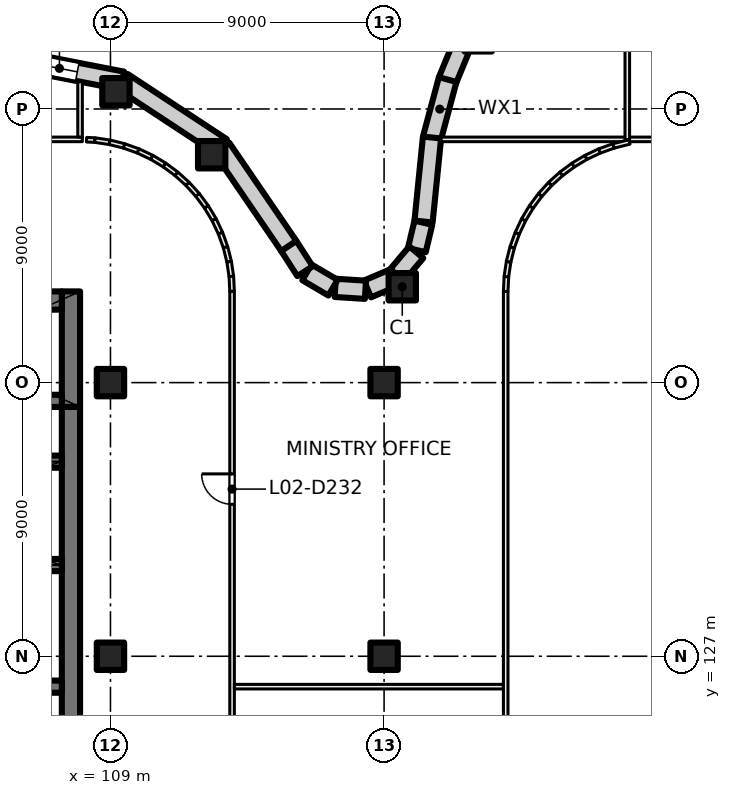
"""IFC4 building model, lengths in metres.
Left out: names, types, materials, properties, quantities, classifications, styles, units other than length and angle.
Written with IfcOpenShell. Run it as: python <this file> out.ifc"""

import sys

from ifc_helpers import new_model, si_unit, direction, frame, frame_2d, origin, origin_2d, place, context, subcontext, project, spatial, rectangle, extrude, element, fill, save


model = new_model("IFC4")
c1 = context("Model", 3, precision=1e-05, world=origin(), true_north=direction((0.0, 1.0)))
c2 = subcontext(c1, "Body", "Model", "MODEL_VIEW")
j1 = project(units=[si_unit("LENGTHUNIT", "METRE"), si_unit("PLANEANGLEUNIT", "RADIAN")], contexts=[c1])
p1 = place(None, origin())
s1 = spatial("IfcSite", under=j1, at=p1, CompositionType="ELEMENT")
p2 = place(p1, origin())
s2 = spatial("IfcBuilding", under=s1, at=p2, CompositionType="ELEMENT")
p3 = place(p2, frame((0.0, 0.0, 12.5)))
s3 = spatial("IfcBuildingStorey", under=s2, at=p3, CompositionType="ELEMENT", Elevation=12.5)
for number, where, z_axis, x_axis in (
    (1, (109.0, 127.0, 0.0), (0.0, 0.0, 1.0), (1.0, 0.0, 0.0)),
    (2, (109.0, 136.0, 0.0), (0.0, 0.0, 1.0), (1.0, 0.0, 0.0)),
    (3, (118.0, 127.0, 0.0), (0.0, 0.0, 1.0), (1.0, 0.0, 0.0)),
    (4, (118.0, 136.0, 0.0), (0.0, 0.0, 1.0), (1.0, 0.0, 0.0)),
    (5, (109.18, 145.567, 0.0), (0.0, 0.0, 1.0), (1.0, 0.0, 0.0)),
    (6, (112.329, 143.496, 0.0), (0.0, 0.0, 1.0), (1.0, 0.0, 0.0)),
    (7, (118.598, 139.153, 0.0), (0.0, 0.0, 1.0), (1.0, 0.0, 0.0)),
):
    element("IfcColumn", number, at=place(p3, frame(where, z_axis=z_axis, x_axis=x_axis)), inside=s3, PredefinedType="COLUMN", context=c2, shape_type="SweptSolid", body=[
        extrude(rectangle(XDim=0.9, YDim=0.9, at=origin_2d()), origin(), (0.0, 0.0, 1.0), 5.0),
    ])
p4 = place(p3, frame((107.7, 139.0, 0.0), z_axis=(0.0, 0.0, 1.0), x_axis=(0.0, -1.0, 0.0)))
e8 = element("IfcWall", 8, at=p4, inside=s3, PredefinedType="SHEAR", context=c2, shape_type="SweptSolid", body=[
    extrude(rectangle(XDim=3.8, YDim=0.6, at=frame_2d((1.9, 0.0))), origin(), (0.0, 0.0, 1.0), 5.0),
])
p5 = place(p3, frame((107.7, 135.2, 0.0), z_axis=(0.0, 0.0, 1.0), x_axis=(0.0, -1.0, 0.0)))
e9 = element("IfcWall", 9, at=p5, inside=s3, PredefinedType="SHEAR", context=c2, shape_type="SweptSolid", body=[
    extrude(rectangle(XDim=14.4, YDim=0.6, at=frame_2d((7.2, 0.0))), origin(), (0.0, 0.0, 1.0), 5.0),
])
p6 = place(p3, frame((107.4, 138.7, 0.0), z_axis=(0.0, 0.0, 1.0), x_axis=(-1.0, 0.0, 0.0)))
e10 = element("IfcWall", 10, at=p6, inside=s3, PredefinedType="SHEAR", context=c2, shape_type="SweptSolid", body=[
    extrude(rectangle(XDim=7.8, YDim=0.6, at=frame_2d((3.9, 0.0))), origin(), (0.0, 0.0, 1.0), 5.0),
])
p7 = place(p3, frame((107.4, 135.4, 0.0), z_axis=(0.0, 0.0, 1.0), x_axis=(-1.0, 0.0, 0.0)))
e11 = element("IfcWall", 11, at=p7, inside=s3, PredefinedType="SHEAR", context=c2, shape_type="SweptSolid", body=[
    extrude(rectangle(XDim=7.8, YDim=0.4, at=frame_2d((3.9, 0.0))), origin(), (0.0, 0.0, 1.0), 5.0),
])
p8 = place(p3, frame((107.4, 130.0, 0.0), z_axis=(0.0, 0.0, 1.0), x_axis=(-1.0, 0.0, 0.0)))
e12 = element("IfcWall", 12, at=p8, inside=s3, PredefinedType="SHEAR", context=c2, shape_type="SweptSolid", body=[
    extrude(rectangle(XDim=12.2, YDim=0.4, at=frame_2d((6.1, 0.0))), origin(), (0.0, 0.0, 1.0), 5.0),
])
p9 = place(p8, frame((5.45, 0.0, 0.0)))
e13 = element("IfcOpeningElement", 13, at=p9, cuts=e12, PredefinedType="OPENING", context=c2, shape_type="SweptSolid", body=[
    extrude(rectangle(XDim=1.1, YDim=2.1, at=frame_2d((0.55, 1.05))), frame((0.0, 0.21, 0.0), z_axis=(0.0, -1.0, 0.0), x_axis=(1.0, 0.0, 0.0)), (0.0, 0.0, 1.0), 0.42),
])
p10 = place(p8, frame((7.85, 0.0, 0.0)))
e14 = element("IfcOpeningElement", 14, at=p10, cuts=e12, PredefinedType="OPENING", context=c2, shape_type="SweptSolid", body=[
    extrude(rectangle(XDim=1.1, YDim=2.1, at=frame_2d((0.55, 1.05))), frame((0.0, 0.21, 0.0), z_axis=(0.0, -1.0, 0.0), x_axis=(1.0, 0.0, 0.0)), (0.0, 0.0, 1.0), 0.42),
])
p11 = place(p3, frame((107.4, 133.4, 0.0), z_axis=(0.0, 0.0, 1.0), x_axis=(-1.0, 0.0, 0.0)))
e15 = element("IfcWall", 15, at=p11, inside=s3, PredefinedType="SHEAR", context=c2, shape_type="SweptSolid", body=[
    extrude(rectangle(XDim=12.2, YDim=0.4, at=frame_2d((6.1, 0.0))), origin(), (0.0, 0.0, 1.0), 5.0),
])
p12 = place(p11, frame((10.3, 0.0, 0.0)))
e16 = element("IfcOpeningElement", 16, at=p12, cuts=e15, PredefinedType="OPENING", context=c2, shape_type="SweptSolid", body=[
    extrude(rectangle(XDim=1.1, YDim=2.1, at=frame_2d((0.55, 1.05))), frame((0.0, 0.21, 0.0), z_axis=(0.0, -1.0, 0.0), x_axis=(1.0, 0.0, 0.0)), (0.0, 0.0, 1.0), 0.42),
])
p13 = place(p3, frame((107.4, 126.0, 0.0), z_axis=(0.0, 0.0, 1.0), x_axis=(-1.0, 0.0, 0.0)))
e17 = element("IfcWall", 17, at=p13, inside=s3, PredefinedType="SHEAR", context=c2, shape_type="SweptSolid", body=[
    extrude(rectangle(XDim=12.2, YDim=0.4, at=frame_2d((6.1, 0.0))), origin(), (0.0, 0.0, 1.0), 5.0),
])
p14 = place(p13, frame((10.25, 0.0, 0.0)))
e18 = element("IfcOpeningElement", 18, at=p14, cuts=e17, PredefinedType="OPENING", context=c2, shape_type="SweptSolid", body=[
    extrude(rectangle(XDim=1.1, YDim=2.1, at=frame_2d((0.55, 1.05))), frame((0.0, 0.21, 0.0), z_axis=(0.0, -1.0, 0.0), x_axis=(1.0, 0.0, 0.0)), (0.0, 0.0, 1.0), 0.42),
])
p15 = place(p13, frame((0.7, 0.0, 0.0)))
e19 = element("IfcOpeningElement", 19, at=p15, cuts=e17, PredefinedType="OPENING", context=c2, shape_type="SweptSolid", body=[
    extrude(rectangle(XDim=0.8, YDim=2.1, at=frame_2d((0.4, 1.05))), frame((0.0, 0.21, 0.0), z_axis=(0.0, -1.0, 0.0), x_axis=(1.0, 0.0, 0.0)), (0.0, 0.0, 1.0), 0.42),
])
p16 = place(p3, frame((120.079, 145.931, 0.0), z_axis=(0.0, 0.0, 1.0), x_axis=(0.382375593358, 0.924006983526, 0.0)))
e20 = element("IfcWall", 20, at=p16, inside=s3, PredefinedType="SOLIDWALL", context=c2, shape_type="SweptSolid", body=[
    extrude(rectangle(XDim=2.114, YDim=0.6, at=frame_2d((1.057, 0.0))), origin(), (0.0, 0.0, 1.0), 4.6),
])
p17 = place(p3, frame((119.571, 144.024, 0.0), z_axis=(0.0, 0.0, 1.0), x_axis=(0.25888565912, 0.965907974655, 0.0)))
e21 = element("IfcWall", 21, at=p17, inside=s3, PredefinedType="SOLIDWALL", context=c2, shape_type="SweptSolid", body=[
    extrude(rectangle(XDim=2.012, YDim=0.6, at=frame_2d((1.006, 0.0))), origin(), (0.0, 0.0, 1.0), 4.6),
])
p18 = place(p3, frame((119.299, 141.298, 0.0), z_axis=(0.0, 0.0, 1.0), x_axis=(0.100121632527, 0.994975205068, 0.0)))
e22 = element("IfcWall", 22, at=p18, inside=s3, PredefinedType="SOLIDWALL", context=c2, shape_type="SweptSolid", body=[
    extrude(rectangle(XDim=2.777, YDim=0.6, at=frame_2d((1.389, 0.0))), origin(), (0.0, 0.0, 1.0), 4.6),
])
p19 = place(p3, frame((119.077, 140.358, 0.0), z_axis=(0.0, 0.0, 1.0), x_axis=(0.231477954295, 0.972840149601, 0.0)))
e23 = element("IfcWall", 23, at=p19, inside=s3, PredefinedType="SOLIDWALL", context=c2, shape_type="SweptSolid", body=[
    extrude(rectangle(XDim=0.926, YDim=0.6, at=frame_2d((0.463, 0.0))), origin(), (0.0, 0.0, 1.0), 4.6),
])
for number, where, z_axis, x_axis in (
    (24, (118.417, 139.526, 0.0), (0.0, 0.0, 1.0), (0.645, 0.764, 0.0)),
    (25, (117.454, 139.081, 0.0), (0.0, 0.0, 1.0), (0.92, 0.392, 0.0)),
    (26, (116.393, 139.117, 0.0), (0.0, 0.0, 1.0), (0.998, -0.064, 0.0)),
    (27, (115.461, 139.627, 0.0), (0.0, 0.0, 1.0), (0.862, -0.507, 0.0)),
):
    element("IfcWall", number, at=place(p3, frame(where, z_axis=z_axis, x_axis=x_axis)), inside=s3, PredefinedType="SOLIDWALL", context=c2, shape_type="SweptSolid", body=[
        extrude(rectangle(XDim=0.996, YDim=0.6, at=frame_2d((0.498, 0.0))), origin(), (0.0, 0.0, 1.0), 4.6),
    ])
p20 = place(p3, frame((114.86, 140.502, 0.0), z_axis=(0.0, 0.0, 1.0), x_axis=(0.541339592117, -0.84080404733, 0.0)))
e28 = element("IfcWall", 28, at=p20, inside=s3, PredefinedType="SOLIDWALL", context=c2, shape_type="SweptSolid", body=[
    extrude(rectangle(XDim=0.996, YDim=0.6, at=frame_2d((0.498, 0.0))), origin(), (0.0, 0.0, 1.0), 4.6),
])
p21 = place(p3, frame((112.661, 143.72, 0.0), z_axis=(0.0, 0.0, 1.0), x_axis=(0.564314082571, -0.825560183277, 0.0)))
e29 = element("IfcWall", 29, at=p21, inside=s3, PredefinedType="SOLIDWALL", context=c2, shape_type="SweptSolid", body=[
    extrude(rectangle(XDim=3.905, YDim=0.6, at=frame_2d((1.953, 0.0))), origin(), (0.0, 0.0, 1.0), 4.6),
])
p22 = place(p3, frame((109.401, 145.9, 0.0), z_axis=(0.0, 0.0, 1.0), x_axis=(0.835543958523, -0.549423601037, 0.0)))
e30 = element("IfcWall", 30, at=p22, inside=s3, PredefinedType="SOLIDWALL", context=c2, shape_type="SweptSolid", body=[
    extrude(rectangle(XDim=3.906, YDim=0.6, at=frame_2d((1.953, 0.0))), origin(), (0.0, 0.0, 1.0), 4.6),
])
p23 = place(p3, frame((105.44, 146.702, 0.0), z_axis=(0.0, 0.0, 1.0), x_axis=(0.981593603981, -0.190981665674, 0.0)))
e31 = element("IfcWall", 31, at=p23, inside=s3, PredefinedType="SOLIDWALL", context=c2, shape_type="SweptSolid", body=[
    extrude(rectangle(XDim=4.025, YDim=0.6, at=frame_2d((2.013, 0.0))), origin(), (0.0, 0.0, 1.0), 4.6),
])
p24 = place(p23, frame((1.316, 0.0, 0.9)))
e32 = element("IfcOpeningElement", 32, at=p24, cuts=e31, PredefinedType="OPENING", context=c2, shape_type="SweptSolid", body=[
    extrude(rectangle(XDim=1.2, YDim=3.0, at=frame_2d((0.6, 1.5))), frame((0.0, 0.31, 0.0), z_axis=(0.0, -1.0, 0.0), x_axis=(1.0, 0.0, 0.0)), (0.0, 0.0, 1.0), 0.62),
])
p25 = place(p3, frame((72.075, 144.0, 0.0), z_axis=(0.0, 0.0, 1.0), x_axis=(1.0, 0.0, 0.0)))
e33 = element("IfcWall", 33, at=p25, inside=s3, PredefinedType="PARTITIONING", context=c2, shape_type="SweptSolid", body=[
    extrude(rectangle(XDim=36.0, YDim=0.15, at=frame_2d((18.0, 0.0))), origin(), (0.0, 0.0, 1.0), 4.6),
])
p26 = place(p25, frame((26.925, 0.0, 0.0)))
e34 = element("IfcOpeningElement", 34, at=p26, cuts=e33, PredefinedType="OPENING", context=c2, shape_type="SweptSolid", body=[
    extrude(rectangle(XDim=1.0, YDim=2.1, at=frame_2d((0.5, 1.05))), frame((0.0, 0.085, 0.0), z_axis=(0.0, -1.0, 0.0), x_axis=(1.0, 0.0, 0.0)), (0.0, 0.0, 1.0), 0.17),
])
p27 = place(p3, frame((108.0, 144.075, 0.0), z_axis=(0.0, 0.0, 1.0), x_axis=(0.0, 1.0, 0.0)))
e35 = element("IfcWall", 35, at=p27, inside=s3, PredefinedType="PARTITIONING", context=c2, shape_type="SweptSolid", body=[
    extrude(rectangle(XDim=1.823, YDim=0.15, at=frame_2d((0.912, 0.0))), origin(), (0.0, 0.0, 1.0), 4.6),
])
p28 = place(p3, frame((108.214, 143.99, 0.0), z_axis=(0.0, 0.0, 1.0), x_axis=(0.99876534507, -0.049676810357, 0.0)))
e36 = element("IfcWall", 36, at=p28, inside=s3, PredefinedType="PARTITIONING", context=c2, shape_type="SweptSolid", body=[
    extrude(rectangle(XDim=0.28, YDim=0.15, at=frame_2d((0.14, 0.0))), origin(), (0.0, 0.0, 1.0), 4.6),
])
p29 = place(p3, frame((108.486, 143.977, 0.0), z_axis=(0.0, 0.0, 1.0), x_axis=(0.988925572052, -0.148412307247, 0.0)))
e37 = element("IfcWall", 37, at=p29, inside=s3, PredefinedType="PARTITIONING", context=c2, shape_type="SweptSolid", body=[
    extrude(rectangle(XDim=0.499, YDim=0.15, at=frame_2d((0.249, 0.0))), origin(), (0.0, 0.0, 1.0), 4.6),
])
p30 = place(p3, frame((108.971, 143.905, 0.0), z_axis=(0.0, 0.0, 1.0), x_axis=(0.970113715952, -0.242650732785, 0.0)))
e38 = element("IfcWall", 38, at=p30, inside=s3, PredefinedType="PARTITIONING", context=c2, shape_type="SweptSolid", body=[
    extrude(rectangle(XDim=0.499, YDim=0.15, at=frame_2d((0.25, 0.0))), origin(), (0.0, 0.0, 1.0), 4.6),
])
for number, where, z_axis, x_axis in (
    (39, (109.447, 143.786, 0.0), (0.0, 0.0, 1.0), (0.941, -0.337, 0.0)),
    (40, (109.91, 143.621, 0.0), (0.0, 0.0, 1.0), (0.904, -0.428, 0.0)),
):
    element("IfcWall", number, at=place(p3, frame(where, z_axis=z_axis, x_axis=x_axis)), inside=s3, PredefinedType="PARTITIONING", context=c2, shape_type="SweptSolid", body=[
        extrude(rectangle(XDim=0.498, YDim=0.15, at=frame_2d((0.249, 0.0))), origin(), (0.0, 0.0, 1.0), 4.6),
    ])
p31 = place(p3, frame((110.354, 143.412, 0.0), z_axis=(0.0, 0.0, 1.0), x_axis=(0.85671397893, -0.515791778052, 0.0)))
e41 = element("IfcWall", 41, at=p31, inside=s3, PredefinedType="PARTITIONING", context=c2, shape_type="SweptSolid", body=[
    extrude(rectangle(XDim=0.499, YDim=0.15, at=frame_2d((0.249, 0.0))), origin(), (0.0, 0.0, 1.0), 4.6),
])
p32 = place(p3, frame((110.775, 143.159, 0.0), z_axis=(0.0, 0.0, 1.0), x_axis=(0.80404358372, -0.594570362092, 0.0)))
e42 = element("IfcWall", 42, at=p32, inside=s3, PredefinedType="PARTITIONING", context=c2, shape_type="SweptSolid", body=[
    extrude(rectangle(XDim=0.498, YDim=0.15, at=frame_2d((0.249, 0.0))), origin(), (0.0, 0.0, 1.0), 4.6),
])
for number, where, z_axis, x_axis in (
    (43, (111.169, 142.867, 0.0), (0.0, 0.0, 1.0), (0.742, -0.67, 0.0)),
    (44, (111.533, 142.539, 0.0), (0.0, 0.0, 1.0), (0.67, -0.742, 0.0)),
):
    element("IfcWall", number, at=place(p3, frame(where, z_axis=z_axis, x_axis=x_axis)), inside=s3, PredefinedType="PARTITIONING", context=c2, shape_type="SweptSolid", body=[
        extrude(rectangle(XDim=0.499, YDim=0.15, at=frame_2d((0.249, 0.0))), origin(), (0.0, 0.0, 1.0), 4.6),
    ])
p33 = place(p3, frame((111.863, 142.175, 0.0), z_axis=(0.0, 0.0, 1.0), x_axis=(0.594570362092, -0.80404358372, 0.0)))
e45 = element("IfcWall", 45, at=p33, inside=s3, PredefinedType="PARTITIONING", context=c2, shape_type="SweptSolid", body=[
    extrude(rectangle(XDim=0.498, YDim=0.15, at=frame_2d((0.249, 0.0))), origin(), (0.0, 0.0, 1.0), 4.6),
])
p34 = place(p3, frame((112.155, 141.781, 0.0), z_axis=(0.0, 0.0, 1.0), x_axis=(0.515791778052, -0.85671397893, 0.0)))
e46 = element("IfcWall", 46, at=p34, inside=s3, PredefinedType="PARTITIONING", context=c2, shape_type="SweptSolid", body=[
    extrude(rectangle(XDim=0.499, YDim=0.15, at=frame_2d((0.249, 0.0))), origin(), (0.0, 0.0, 1.0), 4.6),
])
for number, where, z_axis, x_axis in (
    (47, (112.408, 141.36, 0.0), (0.0, 0.0, 1.0), (0.428, -0.904, 0.0)),
    (48, (112.618, 140.916, 0.0), (0.0, 0.0, 1.0), (0.337, -0.941, 0.0)),
):
    element("IfcWall", number, at=place(p3, frame(where, z_axis=z_axis, x_axis=x_axis)), inside=s3, PredefinedType="PARTITIONING", context=c2, shape_type="SweptSolid", body=[
        extrude(rectangle(XDim=0.498, YDim=0.15, at=frame_2d((0.249, 0.0))), origin(), (0.0, 0.0, 1.0), 4.6),
    ])
p35 = place(p3, frame((112.784, 140.455, 0.0), z_axis=(0.0, 0.0, 1.0), x_axis=(0.242650732785, -0.970113715952, 0.0)))
e49 = element("IfcWall", 49, at=p35, inside=s3, PredefinedType="PARTITIONING", context=c2, shape_type="SweptSolid", body=[
    extrude(rectangle(XDim=0.499, YDim=0.15, at=frame_2d((0.25, 0.0))), origin(), (0.0, 0.0, 1.0), 4.6),
])
p36 = place(p3, frame((112.903, 139.979, 0.0), z_axis=(0.0, 0.0, 1.0), x_axis=(0.148412307247, -0.988925572052, 0.0)))
e50 = element("IfcWall", 50, at=p36, inside=s3, PredefinedType="PARTITIONING", context=c2, shape_type="SweptSolid", body=[
    extrude(rectangle(XDim=0.499, YDim=0.15, at=frame_2d((0.249, 0.0))), origin(), (0.0, 0.0, 1.0), 4.6),
])
p37 = place(p3, frame((112.976, 139.494, 0.0), z_axis=(0.0, 0.0, 1.0), x_axis=(0.048196018647, -0.998837896651, 0.0)))
e51 = element("IfcWall", 51, at=p37, inside=s3, PredefinedType="PARTITIONING", context=c2, shape_type="SweptSolid", body=[
    extrude(rectangle(XDim=0.496, YDim=0.15, at=frame_2d((0.248, 0.0))), origin(), (0.0, 0.0, 1.0), 4.6),
])
p38 = place(p3, frame((113.0, 139.002, 0.0), z_axis=(0.0, 0.0, 1.0), x_axis=(0.0, -1.0, 0.0)))
e52 = element("IfcWall", 52, at=p38, inside=s3, PredefinedType="PARTITIONING", context=c2, shape_type="SweptSolid", body=[
    extrude(rectangle(XDim=22.004, YDim=0.15, at=frame_2d((11.002, 0.0))), origin(), (0.0, 0.0, 1.0), 4.6),
])
p39 = place(p38, frame((17.0, 0.0, 0.0)))
e53 = element("IfcOpeningElement", 53, at=p39, cuts=e52, PredefinedType="OPENING", context=c2, shape_type="SweptSolid", body=[
    extrude(rectangle(XDim=1.0, YDim=2.1, at=frame_2d((0.5, 1.05))), frame((0.0, 0.085, 0.0), z_axis=(0.0, -1.0, 0.0), x_axis=(1.0, 0.0, 0.0)), (0.0, 0.0, 1.0), 0.17),
])
p40 = place(p38, frame((6.004, 0.0, 0.0)))
e54 = element("IfcOpeningElement", 54, at=p40, cuts=e52, PredefinedType="OPENING", context=c2, shape_type="SweptSolid", body=[
    extrude(rectangle(XDim=1.0, YDim=2.1, at=frame_2d((0.5, 1.05))), frame((0.0, 0.085, 0.0), z_axis=(0.0, -1.0, 0.0), x_axis=(1.0, 0.0, 0.0)), (0.0, 0.0, 1.0), 0.17),
])
p41 = place(p3, frame((113.075, 126.0, 0.0), z_axis=(0.0, 0.0, 1.0), x_axis=(1.0, 0.0, 0.0)))
e55 = element("IfcWall", 55, at=p41, inside=s3, PredefinedType="PARTITIONING", context=c2, shape_type="SweptSolid", body=[
    extrude(rectangle(XDim=8.85, YDim=0.15, at=frame_2d((4.425, 0.0))), origin(), (0.0, 0.0, 1.0), 4.6),
])
p42 = place(p3, frame((119.875, 144.0, 0.0), z_axis=(0.0, 0.0, 1.0), x_axis=(1.0, 0.0, 0.0)))
e56 = element("IfcWall", 56, at=p42, inside=s3, PredefinedType="PARTITIONING", context=c2, shape_type="SweptSolid", body=[
    extrude(rectangle(XDim=20.05, YDim=0.15, at=frame_2d((10.025, 0.0))), origin(), (0.0, 0.0, 1.0), 4.6),
])
p43 = place(p42, frame((13.125, 0.0, 0.0)))
e57 = element("IfcOpeningElement", 57, at=p43, cuts=e56, PredefinedType="OPENING", context=c2, shape_type="SweptSolid", body=[
    extrude(rectangle(XDim=1.0, YDim=2.1, at=frame_2d((0.5, 1.05))), frame((0.0, 0.085, 0.0), z_axis=(0.0, -1.0, 0.0), x_axis=(1.0, 0.0, 0.0)), (0.0, 0.0, 1.0), 0.17),
])
p44 = place(p3, frame((122.0, 116.998, 0.0), z_axis=(0.0, 0.0, 1.0), x_axis=(0.0, 1.0, 0.0)))
e58 = element("IfcWall", 58, at=p44, inside=s3, PredefinedType="PARTITIONING", context=c2, shape_type="SweptSolid", body=[
    extrude(rectangle(XDim=22.004, YDim=0.15, at=frame_2d((11.002, 0.0))), origin(), (0.0, 0.0, 1.0), 4.6),
])
p45 = place(p3, frame((122.0, 138.998, 0.0), z_axis=(0.0, 0.0, 1.0), x_axis=(0.048196018647, 0.998837896651, 0.0)))
e59 = element("IfcWall", 59, at=p45, inside=s3, PredefinedType="PARTITIONING", context=c2, shape_type="SweptSolid", body=[
    extrude(rectangle(XDim=0.496, YDim=0.15, at=frame_2d((0.248, 0.0))), origin(), (0.0, 0.0, 1.0), 4.6),
])
p46 = place(p3, frame((122.023, 139.486, 0.0), z_axis=(0.0, 0.0, 1.0), x_axis=(0.148412307247, 0.988925572052, 0.0)))
e60 = element("IfcWall", 60, at=p46, inside=s3, PredefinedType="PARTITIONING", context=c2, shape_type="SweptSolid", body=[
    extrude(rectangle(XDim=0.499, YDim=0.15, at=frame_2d((0.249, 0.0))), origin(), (0.0, 0.0, 1.0), 4.6),
])
p47 = place(p3, frame((122.095, 139.971, 0.0), z_axis=(0.0, 0.0, 1.0), x_axis=(0.242650732785, 0.970113715952, 0.0)))
e61 = element("IfcWall", 61, at=p47, inside=s3, PredefinedType="PARTITIONING", context=c2, shape_type="SweptSolid", body=[
    extrude(rectangle(XDim=0.499, YDim=0.15, at=frame_2d((0.25, 0.0))), origin(), (0.0, 0.0, 1.0), 4.6),
])
for number, where, z_axis, x_axis in (
    (62, (122.214, 140.447, 0.0), (0.0, 0.0, 1.0), (0.337, 0.941, 0.0)),
    (63, (122.379, 140.91, 0.0), (0.0, 0.0, 1.0), (0.428, 0.904, 0.0)),
):
    element("IfcWall", number, at=place(p3, frame(where, z_axis=z_axis, x_axis=x_axis)), inside=s3, PredefinedType="PARTITIONING", context=c2, shape_type="SweptSolid", body=[
        extrude(rectangle(XDim=0.498, YDim=0.15, at=frame_2d((0.249, 0.0))), origin(), (0.0, 0.0, 1.0), 4.6),
    ])
p48 = place(p3, frame((122.588, 141.354, 0.0), z_axis=(0.0, 0.0, 1.0), x_axis=(0.515791778052, 0.85671397893, 0.0)))
e64 = element("IfcWall", 64, at=p48, inside=s3, PredefinedType="PARTITIONING", context=c2, shape_type="SweptSolid", body=[
    extrude(rectangle(XDim=0.499, YDim=0.15, at=frame_2d((0.249, 0.0))), origin(), (0.0, 0.0, 1.0), 4.6),
])
p49 = place(p3, frame((122.841, 141.775, 0.0), z_axis=(0.0, 0.0, 1.0), x_axis=(0.594570362092, 0.80404358372, 0.0)))
e65 = element("IfcWall", 65, at=p49, inside=s3, PredefinedType="PARTITIONING", context=c2, shape_type="SweptSolid", body=[
    extrude(rectangle(XDim=0.498, YDim=0.15, at=frame_2d((0.249, 0.0))), origin(), (0.0, 0.0, 1.0), 4.6),
])
for number, where, z_axis, x_axis in (
    (66, (123.133, 142.169, 0.0), (0.0, 0.0, 1.0), (0.67, 0.742, 0.0)),
    (67, (123.461, 142.533, 0.0), (0.0, 0.0, 1.0), (0.742, 0.67, 0.0)),
):
    element("IfcWall", number, at=place(p3, frame(where, z_axis=z_axis, x_axis=x_axis)), inside=s3, PredefinedType="PARTITIONING", context=c2, shape_type="SweptSolid", body=[
        extrude(rectangle(XDim=0.499, YDim=0.15, at=frame_2d((0.249, 0.0))), origin(), (0.0, 0.0, 1.0), 4.6),
    ])
p50 = place(p3, frame((123.825, 142.863, 0.0), z_axis=(0.0, 0.0, 1.0), x_axis=(0.80404358372, 0.594570362092, 0.0)))
e68 = element("IfcWall", 68, at=p50, inside=s3, PredefinedType="PARTITIONING", context=c2, shape_type="SweptSolid", body=[
    extrude(rectangle(XDim=0.498, YDim=0.15, at=frame_2d((0.249, 0.0))), origin(), (0.0, 0.0, 1.0), 4.6),
])
p51 = place(p3, frame((124.219, 143.155, 0.0), z_axis=(0.0, 0.0, 1.0), x_axis=(0.85671397893, 0.515791778052, 0.0)))
e69 = element("IfcWall", 69, at=p51, inside=s3, PredefinedType="PARTITIONING", context=c2, shape_type="SweptSolid", body=[
    extrude(rectangle(XDim=0.499, YDim=0.15, at=frame_2d((0.249, 0.0))), origin(), (0.0, 0.0, 1.0), 4.6),
])
for number, where, z_axis, x_axis in (
    (70, (124.64, 143.408, 0.0), (0.0, 0.0, 1.0), (0.904, 0.428, 0.0)),
    (71, (125.084, 143.618, 0.0), (0.0, 0.0, 1.0), (0.941, 0.337, 0.0)),
):
    element("IfcWall", number, at=place(p3, frame(where, z_axis=z_axis, x_axis=x_axis)), inside=s3, PredefinedType="PARTITIONING", context=c2, shape_type="SweptSolid", body=[
        extrude(rectangle(XDim=0.498, YDim=0.15, at=frame_2d((0.249, 0.0))), origin(), (0.0, 0.0, 1.0), 4.6),
    ])
p52 = place(p3, frame((125.545, 143.784, 0.0), z_axis=(0.0, 0.0, 1.0), x_axis=(0.970116111764, 0.242641154168, 0.0)))
e72 = element("IfcWall", 72, at=p52, inside=s3, PredefinedType="PARTITIONING", context=c2, shape_type="SweptSolid", body=[
    extrude(rectangle(XDim=0.544, YDim=0.15, at=frame_2d((0.272, 0.0))), origin(), (0.0, 0.0, 1.0), 4.6),
])
p53 = place(p3, frame((126.0, 143.995, 0.0), z_axis=(0.0, 0.0, 1.0), x_axis=(0.0, 1.0, 0.0)))
e73 = element("IfcWall", 73, at=p53, inside=s3, PredefinedType="PARTITIONING", context=c2, shape_type="SweptSolid", body=[
    extrude(rectangle(XDim=8.159, YDim=0.15, at=frame_2d((4.08, 0.0))), origin(), (0.0, 0.0, 1.0), 4.6),
])
p54 = place(p24, origin())
e74 = element("IfcWindow", 74, at=p54, inside=s3, PartitioningType="SINGLE_PANEL", PredefinedType="WINDOW", context=c2, shape_type="SweptSolid", body=[
    extrude(rectangle(XDim=1.2, YDim=3.0, at=frame_2d((0.6, 1.5))), frame((0.0, 0.03, 0.0), z_axis=(0.0, -1.0, 0.0), x_axis=(1.0, 0.0, 0.0)), (0.0, 0.0, 1.0), 0.06),
])
fill(e32, e74)
p55 = place(p40, origin())
e75 = element("IfcDoor", 75, at=p55, inside=s3, OperationType="SINGLE_SWING_LEFT", PredefinedType="DOOR", context=c2, shape_type="SweptSolid", body=[
    extrude(rectangle(XDim=1.0, YDim=2.1, at=frame_2d((0.5, 1.05))), frame((0.0, 0.025, 0.0), z_axis=(0.0, -1.0, 0.0), x_axis=(1.0, 0.0, 0.0)), (0.0, 0.0, 1.0), 0.05),
])
fill(e54, e75)
save(model, sys.argv[1])
